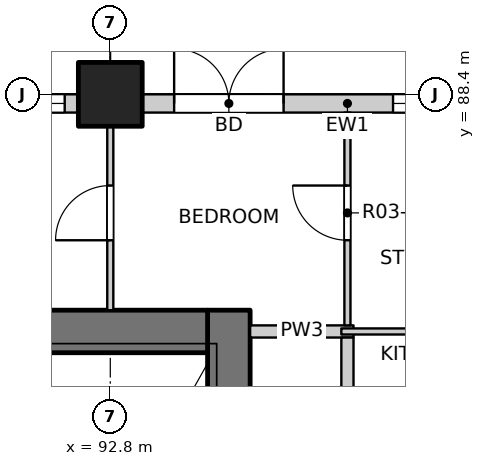
"""IFC4 building model, lengths in metres.
Left out: names, types, materials, properties, quantities, classifications, styles, units other than length and angle.
Written with IfcOpenShell. Run it as: python <this file> out.ifc"""

import sys

from ifc_helpers import new_model, si_unit, direction, frame, frame_2d, origin, origin_2d, place, context, subcontext, project, spatial, rectangle, extrude, element, fill, save


model = new_model("IFC4")
c1 = context("Model", 3, precision=1e-05, world=origin(), true_north=direction((0.0, 1.0)))
c2 = subcontext(c1, "Body", "Model", "MODEL_VIEW")
j1 = project(units=[si_unit("LENGTHUNIT", "METRE"), si_unit("PLANEANGLEUNIT", "RADIAN")], contexts=[c1])
p1 = place(None, origin())
s1 = spatial("IfcSite", under=j1, at=p1, CompositionType="ELEMENT")
p2 = place(p1, origin())
s2 = spatial("IfcBuilding", under=s1, at=p2, CompositionType="ELEMENT")
p3 = place(p2, frame((0.0, 0.0, 39.9)))
s3 = spatial("IfcBuildingStorey", under=s2, at=p3, CompositionType="ELEMENT", Elevation=39.9)
p4 = place(p3, frame((92.8, 88.4, -0.25), z_axis=(0.0, 0.0, 1.0), x_axis=(1.0, 0.0, 0.0)))
e1 = element("IfcColumn", 1, at=p4, inside=s3, PredefinedType="COLUMN", context=c2, shape_type="SweptSolid", body=[
    extrude(rectangle(XDim=1.05, YDim=1.05, at=origin_2d()), origin(), (0.0, 0.0, 1.0), 3.4),
])
p5 = place(p3, frame((94.75, 77.3, -0.25), z_axis=(0.0, 0.0, 1.0), x_axis=(0.0, 1.0, 0.0)))
e2 = element("IfcWall", 2, at=p5, inside=s3, PredefinedType="SOLIDWALL", context=c2, shape_type="SweptSolid", body=[
    extrude(rectangle(XDim=7.55, YDim=0.7, at=frame_2d((3.775, 0.0))), origin(), (0.0, 0.0, 1.0), 3.4),
])
p6 = place(p5, frame((0.3, 0.0, 0.25)))
e3 = element("IfcOpeningElement", 3, at=p6, cuts=e2, PredefinedType="OPENING", context=c2, shape_type="SweptSolid", body=[
    extrude(rectangle(XDim=1.2, YDim=2.1, at=frame_2d((0.6, 1.05))), frame((0.0, 0.36, 0.0), z_axis=(0.0, -1.0, 0.0), x_axis=(1.0, 0.0, 0.0)), (0.0, 0.0, 1.0), 0.72),
])
p7 = place(p3, frame((75.6, 84.5, -0.25), z_axis=(0.0, 0.0, 1.0), x_axis=(1.0, 0.0, 0.0)))
e4 = element("IfcWall", 4, at=p7, inside=s3, PredefinedType="SOLIDWALL", context=c2, shape_type="SweptSolid", body=[
    extrude(rectangle(XDim=18.8, YDim=0.7, at=frame_2d((9.4, 0.0))), origin(), (0.0, 0.0, 1.0), 3.4),
])
p8 = place(p3, frame((85.525, 88.25, 0.0), z_axis=(0.0, 0.0, 1.0), x_axis=(1.0, 0.0, 0.0)))
e5 = element("IfcWall", 5, at=p8, inside=s3, PredefinedType="SOLIDWALL", context=c2, shape_type="SweptSolid", body=[
    extrude(rectangle(XDim=6.75, YDim=0.3, at=frame_2d((3.375, 0.0))), origin(), (0.0, 0.0, 1.0), 2.7),
])
p9 = place(p8, frame((0.525, 0.0, 0.0)))
e6 = element("IfcOpeningElement", 6, at=p9, cuts=e5, PredefinedType="OPENING", context=c2, shape_type="SweptSolid", body=[
    extrude(rectangle(XDim=1.8, YDim=2.4, at=frame_2d((0.9, 1.2))), frame((0.0, 0.16, 0.0), z_axis=(0.0, -1.0, 0.0), x_axis=(1.0, 0.0, 0.0)), (0.0, 0.0, 1.0), 0.32),
])
p10 = place(p8, frame((4.125, 0.0, 0.9)))
e7 = element("IfcOpeningElement", 7, at=p10, cuts=e5, PredefinedType="OPENING", context=c2, shape_type="SweptSolid", body=[
    extrude(rectangle(XDim=2.4, YDim=1.8, at=frame_2d((1.2, 0.9))), frame((0.0, 0.16, 0.0), z_axis=(0.0, -1.0, 0.0), x_axis=(1.0, 0.0, 0.0)), (0.0, 0.0, 1.0), 0.32),
])
p11 = place(p3, frame((93.325, 88.25, 0.0), z_axis=(0.0, 0.0, 1.0), x_axis=(1.0, 0.0, 0.0)))
e8 = element("IfcWall", 8, at=p11, inside=s3, PredefinedType="SOLIDWALL", context=c2, shape_type="SweptSolid", body=[
    extrude(rectangle(XDim=6.75, YDim=0.3, at=frame_2d((3.375, 0.0))), origin(), (0.0, 0.0, 1.0), 2.7),
])
p12 = place(p11, frame((0.525, 0.0, 0.0)))
e9 = element("IfcOpeningElement", 9, at=p12, cuts=e8, PredefinedType="OPENING", context=c2, shape_type="SweptSolid", body=[
    extrude(rectangle(XDim=1.8, YDim=2.4, at=frame_2d((0.9, 1.2))), frame((0.0, 0.16, 0.0), z_axis=(0.0, -1.0, 0.0), x_axis=(1.0, 0.0, 0.0)), (0.0, 0.0, 1.0), 0.32),
])
p13 = place(p11, frame((4.125, 0.0, 0.9)))
e10 = element("IfcOpeningElement", 10, at=p13, cuts=e8, PredefinedType="OPENING", context=c2, shape_type="SweptSolid", body=[
    extrude(rectangle(XDim=2.4, YDim=1.8, at=frame_2d((1.2, 0.9))), frame((0.0, 0.16, 0.0), z_axis=(0.0, -1.0, 0.0), x_axis=(1.0, 0.0, 0.0)), (0.0, 0.0, 1.0), 0.32),
])
p14 = place(p3, frame((95.1, 84.5, 0.0), z_axis=(0.0, 0.0, 1.0), x_axis=(1.0, 0.0, 0.0)))
e11 = element("IfcWall", 11, at=p14, inside=s3, PredefinedType="PARTITIONING", context=c2, shape_type="SweptSolid", body=[
    extrude(rectangle(XDim=1.7, YDim=0.2, at=frame_2d((0.85, 0.0))), origin(), (0.0, 0.0, 1.0), 3.15),
])
p15 = place(p3, frame((96.6, 84.5, 0.0), z_axis=(0.0, 0.0, 1.0), x_axis=(1.0, 0.0, 0.0)))
e12 = element("IfcWall", 12, at=p15, inside=s3, PredefinedType="PARTITIONING", context=c2, shape_type="SweptSolid", body=[
    extrude(rectangle(XDim=11.5, YDim=0.1, at=frame_2d((5.75, 0.0))), origin(), (0.0, 0.0, 1.0), 3.15),
])
p16 = place(p15, frame((2.635, 0.0, 0.0)))
e13 = element("IfcOpeningElement", 13, at=p16, cuts=e12, PredefinedType="OPENING", context=c2, shape_type="SweptSolid", body=[
    extrude(rectangle(XDim=0.9, YDim=2.1, at=frame_2d((0.45, 1.05))), frame((0.0, 0.06, 0.0), z_axis=(0.0, -1.0, 0.0), x_axis=(1.0, 0.0, 0.0)), (0.0, 0.0, 1.0), 0.12),
])
p17 = place(p3, frame((92.8, 84.85, 0.0), z_axis=(0.0, 0.0, 1.0), x_axis=(0.0, 1.0, 0.0)))
e14 = element("IfcWall", 14, at=p17, inside=s3, PredefinedType="PARTITIONING", context=c2, shape_type="SweptSolid", body=[
    extrude(rectangle(XDim=3.25, YDim=0.1, at=frame_2d((1.625, 0.0))), origin(), (0.0, 0.0, 1.0), 3.15),
])
p18 = place(p17, frame((1.15, 0.0, 0.0)))
e15 = element("IfcOpeningElement", 15, at=p18, cuts=e14, PredefinedType="OPENING", context=c2, shape_type="SweptSolid", body=[
    extrude(rectangle(XDim=0.9, YDim=2.1, at=frame_2d((0.45, 1.05))), frame((0.0, 0.06, 0.0), z_axis=(0.0, -1.0, 0.0), x_axis=(1.0, 0.0, 0.0)), (0.0, 0.0, 1.0), 0.12),
])
p19 = place(p3, frame((96.7, 53.4, 0.0), z_axis=(0.0, 0.0, 1.0), x_axis=(0.0, 1.0, 0.0)))
e16 = element("IfcWall", 16, at=p19, inside=s3, PredefinedType="PARTITIONING", context=c2, shape_type="SweptSolid", body=[
    extrude(rectangle(XDim=31.0, YDim=0.2, at=frame_2d((15.5, 0.0))), origin(), (0.0, 0.0, 1.0), 3.15),
])
p20 = place(p19, frame((3.325, 0.0, 0.0)))
e17 = element("IfcOpeningElement", 17, at=p20, cuts=e16, PredefinedType="OPENING", context=c2, shape_type="SweptSolid", body=[
    extrude(rectangle(XDim=1.0, YDim=2.1, at=frame_2d((0.5, 1.05))), frame((0.0, 0.11, 0.0), z_axis=(0.0, -1.0, 0.0), x_axis=(1.0, 0.0, 0.0)), (0.0, 0.0, 1.0), 0.22),
])
p21 = place(p19, frame((11.125, 0.0, 0.0)))
e18 = element("IfcOpeningElement", 18, at=p21, cuts=e16, PredefinedType="OPENING", context=c2, shape_type="SweptSolid", body=[
    extrude(rectangle(XDim=1.0, YDim=2.1, at=frame_2d((0.5, 1.05))), frame((0.0, 0.11, 0.0), z_axis=(0.0, -1.0, 0.0), x_axis=(1.0, 0.0, 0.0)), (0.0, 0.0, 1.0), 0.22),
])
p22 = place(p19, frame((26.875, 0.0, 0.0)))
e19 = element("IfcOpeningElement", 19, at=p22, cuts=e16, PredefinedType="OPENING", context=c2, shape_type="SweptSolid", body=[
    extrude(rectangle(XDim=1.0, YDim=2.1, at=frame_2d((0.5, 1.05))), frame((0.0, 0.11, 0.0), z_axis=(0.0, -1.0, 0.0), x_axis=(1.0, 0.0, 0.0)), (0.0, 0.0, 1.0), 0.22),
])
p23 = place(p3, frame((96.7, 84.6, 0.0), z_axis=(0.0, 0.0, 1.0), x_axis=(0.0, 1.0, 0.0)))
e20 = element("IfcWall", 20, at=p23, inside=s3, PredefinedType="PARTITIONING", context=c2, shape_type="SweptSolid", body=[
    extrude(rectangle(XDim=3.5, YDim=0.1, at=frame_2d((1.75, 0.0))), origin(), (0.0, 0.0, 1.0), 3.15),
])
p24 = place(p23, frame((1.4, 0.0, 0.0)))
e21 = element("IfcOpeningElement", 21, at=p24, cuts=e20, PredefinedType="OPENING", context=c2, shape_type="SweptSolid", body=[
    extrude(rectangle(XDim=0.9, YDim=2.1, at=frame_2d((0.45, 1.05))), frame((0.0, 0.06, 0.0), z_axis=(0.0, -1.0, 0.0), x_axis=(1.0, 0.0, 0.0)), (0.0, 0.0, 1.0), 0.12),
])
p25 = place(p10, origin())
e22 = element("IfcWindow", 22, at=p25, inside=s3, PartitioningType="DOUBLE_PANEL_VERTICAL", PredefinedType="WINDOW", context=c2, shape_type="SweptSolid", body=[
    extrude(rectangle(XDim=2.4, YDim=1.8, at=frame_2d((1.2, 0.9))), frame((0.0, 0.03, 0.0), z_axis=(0.0, -1.0, 0.0), x_axis=(1.0, 0.0, 0.0)), (0.0, 0.0, 1.0), 0.06),
])
fill(e7, e22)
p26 = place(p12, origin())
e23 = element("IfcDoor", 23, at=p26, inside=s3, OperationType="DOUBLE_DOOR_SINGLE_SWING", PredefinedType="DOOR", context=c2, shape_type="SweptSolid", body=[
    extrude(rectangle(XDim=1.8, YDim=2.4, at=frame_2d((0.9, 1.2))), frame((0.0, 0.025, 0.0), z_axis=(0.0, -1.0, 0.0), x_axis=(1.0, 0.0, 0.0)), (0.0, 0.0, 1.0), 0.05),
])
fill(e9, e23)
p27 = place(p13, origin())
e24 = element("IfcWindow", 24, at=p27, inside=s3, PartitioningType="DOUBLE_PANEL_VERTICAL", PredefinedType="WINDOW", context=c2, shape_type="SweptSolid", body=[
    extrude(rectangle(XDim=2.4, YDim=1.8, at=frame_2d((1.2, 0.9))), frame((0.0, 0.03, 0.0), z_axis=(0.0, -1.0, 0.0), x_axis=(1.0, 0.0, 0.0)), (0.0, 0.0, 1.0), 0.06),
])
fill(e10, e24)
p28 = place(p18, origin())
e25 = element("IfcDoor", 25, at=p28, inside=s3, OperationType="SINGLE_SWING_LEFT", PredefinedType="DOOR", context=c2, shape_type="SweptSolid", body=[
    extrude(rectangle(XDim=0.9, YDim=2.1, at=frame_2d((0.45, 1.05))), frame((0.0, 0.025, 0.0), z_axis=(0.0, -1.0, 0.0), x_axis=(1.0, 0.0, 0.0)), (0.0, 0.0, 1.0), 0.05),
])
fill(e15, e25)
p29 = place(p24, origin())
e26 = element("IfcDoor", 26, at=p29, inside=s3, OperationType="SINGLE_SWING_RIGHT", PredefinedType="DOOR", context=c2, shape_type="SweptSolid", body=[
    extrude(rectangle(XDim=0.9, YDim=2.1, at=frame_2d((0.45, 1.05))), frame((0.0, 0.025, 0.0), z_axis=(0.0, -1.0, 0.0), x_axis=(1.0, 0.0, 0.0)), (0.0, 0.0, 1.0), 0.05),
])
fill(e21, e26)
save(model, sys.argv[1])
